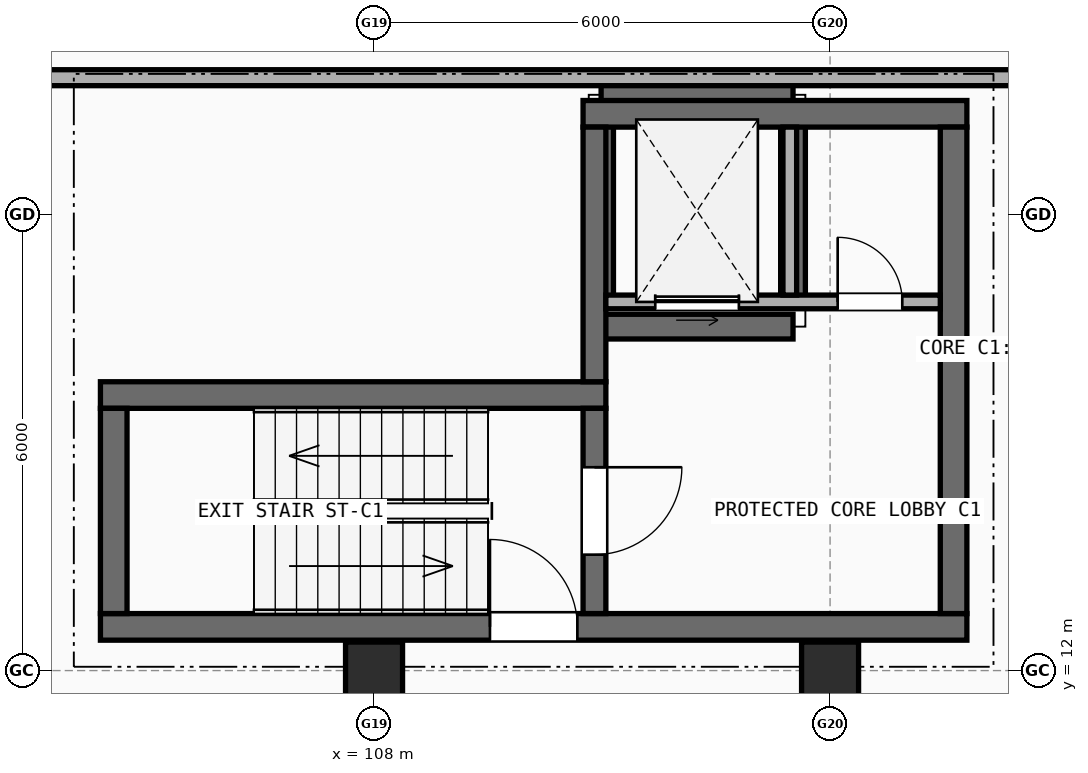
"""IFC4 building model, lengths in metres.
Left out: names, types, materials, properties, quantities, classifications, styles, units other than length and angle.
Written with IfcOpenShell. Run it as: python <this file> out.ifc"""

import sys

from ifc_helpers import new_model, si_unit, direction, frame, frame_2d, origin, origin_2d, place, context, subcontext, project, spatial, rectangle, extrude, element, fill, save


model = new_model("IFC4")
c1 = context("Model", 3, precision=1e-05, world=origin(), true_north=direction((0.0, 1.0)))
c2 = subcontext(c1, "Body", "Model", "MODEL_VIEW")
j1 = project(units=[si_unit("LENGTHUNIT", "METRE"), si_unit("PLANEANGLEUNIT", "RADIAN")], contexts=[c1])
p1 = place(None, origin())
s1 = spatial("IfcSite", under=j1, at=p1, CompositionType="ELEMENT")
p2 = place(p1, origin())
s2 = spatial("IfcBuilding", under=s1, at=p2, CompositionType="ELEMENT")
p3 = place(p2, frame((0.0, 0.0, -4.5)))
s3 = spatial("IfcBuildingStorey", under=s2, at=p3, CompositionType="ELEMENT", Elevation=-4.5)
p4 = place(p3, frame((110.988, 16.525, -1.1), z_axis=(0.0, 0.0, 1.0), x_axis=(1.0, 0.0, 0.0)))
e1 = element("IfcWall", 1, at=p4, inside=s3, PredefinedType="SHEAR", context=c2, shape_type="SweptSolid", body=[
    extrude(rectangle(XDim=2.525, YDim=0.325, at=frame_2d((1.262, 0.0))), origin(), (0.0, 0.0, 1.0), 1.1),
])
p5 = place(p3, frame((113.512, 16.85, -1.1), z_axis=(0.0, 0.0, 1.0), x_axis=(0.0, 1.0, 0.0)))
e2 = element("IfcWall", 2, at=p5, inside=s3, PredefinedType="SHEAR", context=c2, shape_type="SweptSolid", body=[
    extrude(rectangle(XDim=2.4, YDim=0.325, at=frame_2d((1.2, 0.0))), origin(), (0.0, 0.0, 1.0), 1.1),
])
p6 = place(p3, frame((113.512, 19.575, -1.1), z_axis=(0.0, 0.0, 1.0), x_axis=(-1.0, 0.0, 0.0)))
e3 = element("IfcWall", 3, at=p6, inside=s3, PredefinedType="SHEAR", context=c2, shape_type="SweptSolid", body=[
    extrude(rectangle(XDim=2.525, YDim=0.325, at=frame_2d((1.262, 0.0))), origin(), (0.0, 0.0, 1.0), 1.1),
])
p7 = place(p3, frame((110.988, 19.25, -1.1), z_axis=(0.0, 0.0, 1.0), x_axis=(0.0, -1.0, 0.0)))
e4 = element("IfcWall", 4, at=p7, inside=s3, PredefinedType="SHEAR", context=c2, shape_type="SweptSolid", body=[
    extrude(rectangle(XDim=2.4, YDim=0.325, at=frame_2d((1.2, 0.0))), origin(), (0.0, 0.0, 1.0), 1.1),
])
for number, where, z_axis, x_axis in (
    (5, (108.0, 12.0, 0.0), (0.0, 0.0, 1.0), (1.0, 0.0, 0.0)),
    (6, (114.0, 12.0, 0.0), (0.0, 0.0, 1.0), (1.0, 0.0, 0.0)),
):
    element("IfcColumn", number, at=place(p3, frame(where, z_axis=z_axis, x_axis=x_axis)), inside=s3, PredefinedType="COLUMN", context=c2, shape_type="SweptSolid", body=[
        extrude(rectangle(XDim=0.75, YDim=0.75, at=origin_2d()), origin(), (0.0, 0.0, 1.0), 4.215),
    ])
p8 = place(p3, frame((104.4, 12.575, 0.0), z_axis=(0.0, 0.0, 1.0), x_axis=(1.0, 0.0, 0.0)))
e7 = element("IfcWall", 7, at=p8, inside=s3, PredefinedType="SHEAR", context=c2, shape_type="SweptSolid", body=[
    extrude(rectangle(XDim=11.4, YDim=0.35, at=frame_2d((5.7, 0.0))), origin(), (0.0, 0.0, 1.0), 4.215),
])
p9 = place(p8, frame((5.125, 0.0, 0.0)))
e8 = element("IfcOpeningElement", 8, at=p9, cuts=e7, PredefinedType="OPENING", context=c2, shape_type="SweptSolid", body=[
    extrude(rectangle(XDim=1.15, YDim=2.15, at=frame_2d((0.575, 1.075))), frame((0.0, 0.185, 0.0), z_axis=(0.0, -1.0, 0.0), x_axis=(1.0, 0.0, 0.0)), (0.0, 0.0, 1.0), 0.37),
])
p10 = place(p3, frame((111.05, 15.625, 0.0), z_axis=(0.0, 0.0, 1.0), x_axis=(-1.0, 0.0, 0.0)))
e9 = element("IfcWall", 9, at=p10, inside=s3, PredefinedType="SHEAR", context=c2, shape_type="SweptSolid", body=[
    extrude(rectangle(XDim=6.65, YDim=0.35, at=frame_2d((3.325, 0.0))), origin(), (0.0, 0.0, 1.0), 4.215),
])
p11 = place(p3, frame((104.575, 15.45, 0.0), z_axis=(0.0, 0.0, 1.0), x_axis=(0.0, -1.0, 0.0)))
e10 = element("IfcWall", 10, at=p11, inside=s3, PredefinedType="SHEAR", context=c2, shape_type="SweptSolid", body=[
    extrude(rectangle(XDim=2.7, YDim=0.35, at=frame_2d((1.35, 0.0))), origin(), (0.0, 0.0, 1.0), 4.215),
])
p12 = place(p3, frame((110.9, 12.75, 0.0), z_axis=(0.0, 0.0, 1.0), x_axis=(0.0, 1.0, 0.0)))
e11 = element("IfcWall", 11, at=p12, inside=s3, PredefinedType="SHEAR", context=c2, shape_type="SweptSolid", body=[
    extrude(rectangle(XDim=2.7, YDim=0.3, at=frame_2d((1.35, 0.0))), origin(), (0.0, 0.0, 1.0), 4.215),
])
p13 = place(p12, frame((0.775, 0.0, 0.0)))
e12 = element("IfcOpeningElement", 12, at=p13, cuts=e11, PredefinedType="OPENING", context=c2, shape_type="SweptSolid", body=[
    extrude(rectangle(XDim=1.15, YDim=2.15, at=frame_2d((0.575, 1.075))), frame((0.0, 0.16, 0.0), z_axis=(0.0, -1.0, 0.0), x_axis=(1.0, 0.0, 0.0)), (0.0, 0.0, 1.0), 0.32),
])
p14 = place(p3, frame((115.8, 19.325, 0.0), z_axis=(0.0, 0.0, 1.0), x_axis=(-1.0, 0.0, 0.0)))
e13 = element("IfcWall", 13, at=p14, inside=s3, PredefinedType="SHEAR", context=c2, shape_type="SweptSolid", body=[
    extrude(rectangle(XDim=5.05, YDim=0.35, at=frame_2d((2.525, 0.0))), origin(), (0.0, 0.0, 1.0), 4.215),
])
p15 = place(p3, frame((115.625, 12.75, 0.0), z_axis=(0.0, 0.0, 1.0), x_axis=(0.0, 1.0, 0.0)))
e14 = element("IfcWall", 14, at=p15, inside=s3, PredefinedType="SHEAR", context=c2, shape_type="SweptSolid", body=[
    extrude(rectangle(XDim=6.4, YDim=0.35, at=frame_2d((3.2, 0.0))), origin(), (0.0, 0.0, 1.0), 4.215),
])
p16 = place(p3, frame((110.9, 15.8, 0.0), z_axis=(0.0, 0.0, 1.0), x_axis=(0.0, 1.0, 0.0)))
e15 = element("IfcWall", 15, at=p16, inside=s3, PredefinedType="SHEAR", context=c2, shape_type="SweptSolid", body=[
    extrude(rectangle(XDim=3.35, YDim=0.3, at=frame_2d((1.675, 0.0))), origin(), (0.0, 0.0, 1.0), 4.215),
])
p17 = place(p3, frame((111.05, 16.85, 0.0), z_axis=(0.0, 0.0, 1.0), x_axis=(1.0, 0.0, 0.0)))
e16 = element("IfcWall", 16, at=p17, inside=s3, PredefinedType="SOLIDWALL", context=c2, shape_type="SweptSolid", body=[
    extrude(rectangle(XDim=4.4, YDim=0.18, at=frame_2d((2.2, 0.0))), origin(), (0.0, 0.0, 1.0), 4.215),
])
p18 = place(p17, frame((0.65, 0.0, 0.0)))
e17 = element("IfcOpeningElement", 17, at=p18, cuts=e16, PredefinedType="OPENING", context=c2, shape_type="SweptSolid", body=[
    extrude(rectangle(XDim=1.1, YDim=2.15, at=frame_2d((0.55, 1.075))), frame((0.0, 0.1, 0.0), z_axis=(0.0, -1.0, 0.0), x_axis=(1.0, 0.0, 0.0)), (0.0, 0.0, 1.0), 0.2),
])
p19 = place(p17, frame((3.05, 0.0, 0.0)))
e18 = element("IfcOpeningElement", 18, at=p19, cuts=e16, PredefinedType="OPENING", context=c2, shape_type="SweptSolid", body=[
    extrude(rectangle(XDim=0.85, YDim=2.1, at=frame_2d((0.425, 1.05))), frame((0.0, 0.1, 0.0), z_axis=(0.0, -1.0, 0.0), x_axis=(1.0, 0.0, 0.0)), (0.0, 0.0, 1.0), 0.2),
])
p20 = place(p3, frame((113.47, 16.94, 0.0), z_axis=(0.0, 0.0, 1.0), x_axis=(0.0, 1.0, 0.0)))
e19 = element("IfcWall", 19, at=p20, inside=s3, PredefinedType="SOLIDWALL", context=c2, shape_type="SweptSolid", body=[
    extrude(rectangle(XDim=2.21, YDim=0.18, at=frame_2d((1.105, 0.0))), origin(), (0.0, 0.0, 1.0), 4.215),
])
p21 = place(p3, frame((103.54, 19.8, 0.0), z_axis=(0.0, 0.0, 1.0), x_axis=(1.0, 0.0, 0.0)))
e20 = element("IfcWall", 20, at=p21, inside=s3, PredefinedType="SOLIDWALL", context=c2, shape_type="SweptSolid", body=[
    extrude(rectangle(XDim=28.42, YDim=0.21, at=frame_2d((14.21, 0.0))), origin(), (0.0, 0.0, 1.0), 2.897),
])
p22 = place(p9, origin())
e21 = element("IfcDoor", 21, at=p22, inside=s3, OperationType="SINGLE_SWING_LEFT", PredefinedType="DOOR", context=c2, shape_type="SweptSolid", body=[
    extrude(rectangle(XDim=1.15, YDim=2.15, at=frame_2d((0.575, 1.075))), frame((0.0, 0.025, 0.0), z_axis=(0.0, -1.0, 0.0), x_axis=(1.0, 0.0, 0.0)), (0.0, 0.0, 1.0), 0.05),
])
fill(e8, e21)
p23 = place(p13, origin())
e22 = element("IfcDoor", 22, at=p23, inside=s3, OperationType="SINGLE_SWING_RIGHT", PredefinedType="DOOR", context=c2, shape_type="SweptSolid", body=[
    extrude(rectangle(XDim=1.15, YDim=2.15, at=frame_2d((0.575, 1.075))), frame((0.0, 0.025, 0.0), z_axis=(0.0, -1.0, 0.0), x_axis=(1.0, 0.0, 0.0)), (0.0, 0.0, 1.0), 0.05),
])
fill(e12, e22)
p24 = place(p18, origin())
e23 = element("IfcDoor", 23, at=p24, inside=s3, OperationType="SLIDING_TO_LEFT", PredefinedType="DOOR", context=c2, shape_type="SweptSolid", body=[
    extrude(rectangle(XDim=1.1, YDim=2.15, at=frame_2d((0.55, 1.075))), frame((0.0, 0.025, 0.0), z_axis=(0.0, -1.0, 0.0), x_axis=(1.0, 0.0, 0.0)), (0.0, 0.0, 1.0), 0.05),
])
fill(e17, e23)
p25 = place(p19, frame((0.85, 0.0, 0.0), z_axis=(0.0, 0.0, 1.0), x_axis=(-1.0, 0.0, 0.0)))
e24 = element("IfcDoor", 24, at=p25, inside=s3, OperationType="SINGLE_SWING_LEFT", PredefinedType="DOOR", context=c2, shape_type="SweptSolid", body=[
    extrude(rectangle(XDim=0.85, YDim=2.1, at=frame_2d((0.425, 1.05))), frame((0.0, 0.025, 0.0), z_axis=(0.0, -1.0, 0.0), x_axis=(1.0, 0.0, 0.0)), (0.0, 0.0, 1.0), 0.05),
])
fill(e18, e24)
save(model, sys.argv[1])
